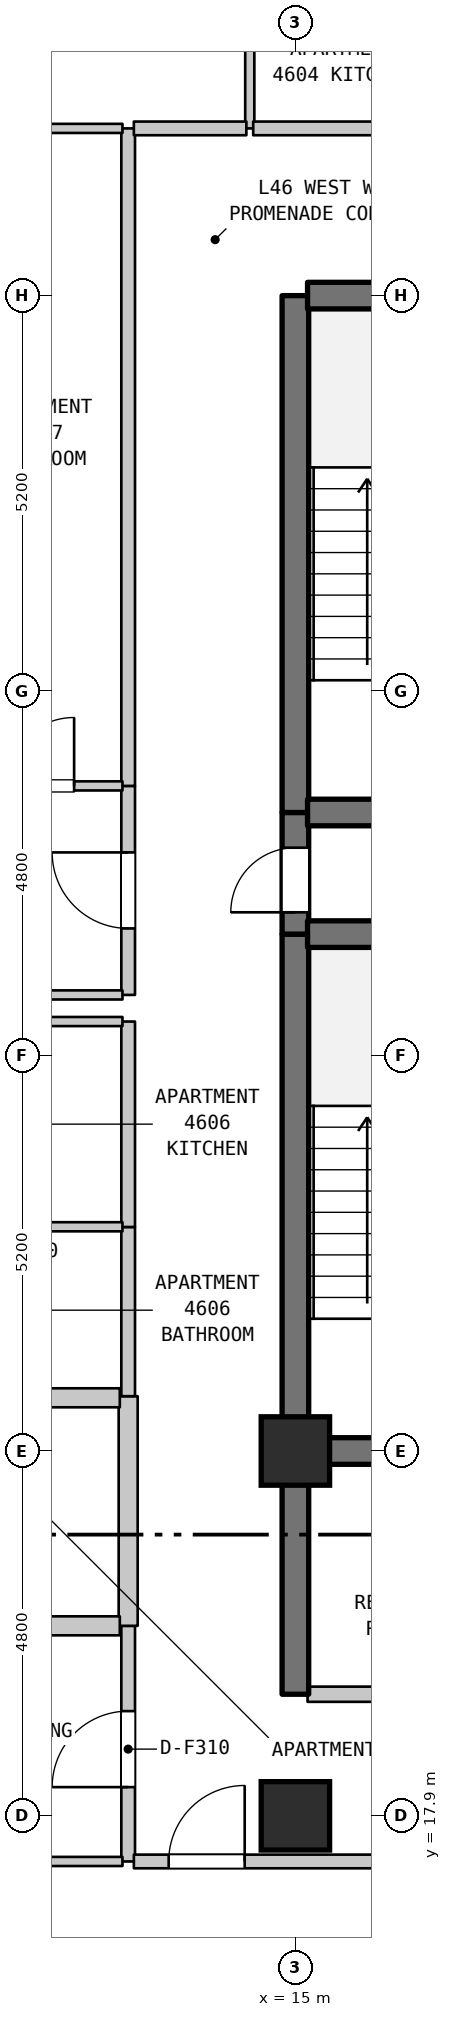
"""IFC4 building model, lengths in metres.
Left out: names, types, materials, properties, quantities, classifications, styles, units other than length and angle.
Written with IfcOpenShell. Run it as: python <this file> out.ifc"""

import sys

from ifc_helpers import new_model, si_unit, direction, frame, frame_2d, origin, origin_2d, place, context, subcontext, project, spatial, rectangle, extrude, element, fill, save


model = new_model("IFC4")
c1 = context("Model", 3, precision=1e-05, world=origin(), true_north=direction((0.0, 1.0)))
c2 = subcontext(c1, "Body", "Model", "MODEL_VIEW")
j1 = project(units=[si_unit("LENGTHUNIT", "METRE"), si_unit("PLANEANGLEUNIT", "RADIAN")], contexts=[c1])
p1 = place(None, origin())
s1 = spatial("IfcSite", under=j1, at=p1, CompositionType="ELEMENT")
p2 = place(p1, origin())
s2 = spatial("IfcBuilding", under=s1, at=p2, CompositionType="ELEMENT")
p3 = place(p2, frame((0.0, 0.0, 188.4)))
s3 = spatial("IfcBuildingStorey", under=s2, at=p3, CompositionType="ELEMENT", Elevation=188.4)
for number, where, z_axis, x_axis in (
    (1, (15.0, 17.9, 0.0), (0.0, 0.0, 1.0), (1.0, 0.0, 0.0)),
    (2, (15.0, 22.7, 0.0), (0.0, 0.0, 1.0), (1.0, 0.0, 0.0)),
):
    element("IfcColumn", number, at=place(p3, frame(where, z_axis=z_axis, x_axis=x_axis)), inside=s3, PredefinedType="COLUMN", context=c2, shape_type="SweptSolid", body=[
        extrude(rectangle(XDim=0.9, YDim=0.9, at=origin_2d()), origin(), (0.0, 0.0, 1.0), 3.7),
    ])
p4 = place(p3, frame((12.8, 17.3, 0.0), z_axis=(0.0, 0.0, 1.0), x_axis=(0.0, 1.0, 0.0)))
e3 = element("IfcWall", 3, at=p4, inside=s3, PredefinedType="STANDARD", context=c2, shape_type="SweptSolid", body=[
    extrude(rectangle(XDim=3.1, YDim=0.18, at=frame_2d((1.55, 0.0))), origin(), (0.0, 0.0, 1.0), 3.39),
])
p5 = place(p4, frame((0.978, 0.0, 0.0)))
e4 = element("IfcOpeningElement", 4, at=p5, cuts=e3, PredefinedType="OPENING", context=c2, shape_type="SweptSolid", body=[
    extrude(rectangle(XDim=1.0, YDim=2.15, at=frame_2d((0.5, 1.075))), frame((0.0, 0.1, 0.0), z_axis=(0.0, -1.0, 0.0), x_axis=(1.0, 0.0, 0.0)), (0.0, 0.0, 1.0), 0.2),
])
p6 = place(p3, frame((12.8, 20.4, 0.0), z_axis=(0.0, 0.0, 1.0), x_axis=(0.0, 1.0, 0.0)))
e5 = element("IfcWall", 5, at=p6, inside=s3, PredefinedType="STANDARD", context=c2, shape_type="SweptSolid", body=[
    extrude(rectangle(XDim=3.021, YDim=0.25, at=frame_2d((1.51, 0.0))), origin(), (0.0, 0.0, 1.0), 3.39),
])
p7 = place(p3, frame((12.8, 23.421, 0.0), z_axis=(0.0, 0.0, 1.0), x_axis=(0.0, 1.0, 0.0)))
e6 = element("IfcWall", 6, at=p7, inside=s3, PredefinedType="STANDARD", context=c2, shape_type="SweptSolid", body=[
    extrude(rectangle(XDim=2.226, YDim=0.18, at=frame_2d((1.113, 0.0))), origin(), (0.0, 0.0, 1.0), 3.39),
])
p8 = place(p3, frame((12.8, 25.647, 0.0), z_axis=(0.0, 0.0, 1.0), x_axis=(0.0, 1.0, 0.0)))
e7 = element("IfcWall", 7, at=p8, inside=s3, PredefinedType="STANDARD", context=c2, shape_type="SweptSolid", body=[
    extrude(rectangle(XDim=2.703, YDim=0.18, at=frame_2d((1.352, 0.0))), origin(), (0.0, 0.0, 1.0), 3.39),
])
p9 = place(p3, frame((12.8, 28.7, 0.0), z_axis=(0.0, 0.0, 1.0), x_axis=(0.0, 1.0, 0.0)))
e8 = element("IfcWall", 8, at=p9, inside=s3, PredefinedType="STANDARD", context=c2, shape_type="SweptSolid", body=[
    extrude(rectangle(XDim=2.75, YDim=0.18, at=frame_2d((1.375, 0.0))), origin(), (0.0, 0.0, 1.0), 3.39),
])
p10 = place(p9, frame((0.875, 0.0, 0.0)))
e9 = element("IfcOpeningElement", 9, at=p10, cuts=e8, PredefinedType="OPENING", context=c2, shape_type="SweptSolid", body=[
    extrude(rectangle(XDim=1.0, YDim=2.15, at=frame_2d((0.5, 1.075))), frame((0.0, 0.1, 0.0), z_axis=(0.0, -1.0, 0.0), x_axis=(1.0, 0.0, 0.0)), (0.0, 0.0, 1.0), 0.2),
])
p11 = place(p3, frame((12.8, 31.45, 0.0), z_axis=(0.0, 0.0, 1.0), x_axis=(0.0, 1.0, 0.0)))
e10 = element("IfcWall", 10, at=p11, inside=s3, PredefinedType="STANDARD", context=c2, shape_type="SweptSolid", body=[
    extrude(rectangle(XDim=8.65, YDim=0.18, at=frame_2d((4.325, 0.0))), origin(), (0.0, 0.0, 1.0), 3.39),
])
p12 = place(p3, frame((14.4, 40.1, 0.0), z_axis=(0.0, 0.0, 1.0), x_axis=(0.0, 1.0, 0.0)))
e11 = element("IfcWall", 11, at=p12, inside=s3, PredefinedType="PARTITIONING", context=c2, shape_type="SweptSolid", body=[
    extrude(rectangle(XDim=2.3, YDim=0.12, at=frame_2d((1.15, 0.0))), origin(), (0.0, 0.0, 1.0), 3.39),
])
p13 = place(p3, frame((15.0, 19.5, 0.0), z_axis=(0.0, 0.0, 1.0), x_axis=(0.0, 1.0, 0.0)))
e12 = element("IfcWall", 12, at=p13, inside=s3, PredefinedType="SHEAR", context=c2, shape_type="SweptSolid", body=[
    extrude(rectangle(XDim=3.2, YDim=0.35, at=frame_2d((1.6, 0.0))), origin(), (0.0, 0.0, 1.0), 3.39),
])
p14 = place(p3, frame((15.0, 22.7, 0.0), z_axis=(0.0, 0.0, 1.0), x_axis=(0.0, 1.0, 0.0)))
e13 = element("IfcWall", 13, at=p14, inside=s3, PredefinedType="SHEAR", context=c2, shape_type="SweptSolid", body=[
    extrude(rectangle(XDim=6.8, YDim=0.35, at=frame_2d((3.4, 0.0))), origin(), (0.0, 0.0, 1.0), 3.39),
])
p15 = place(p3, frame((15.0, 29.5, 0.0), z_axis=(0.0, 0.0, 1.0), x_axis=(0.0, 1.0, 0.0)))
e14 = element("IfcWall", 14, at=p15, inside=s3, PredefinedType="SHEAR", context=c2, shape_type="SweptSolid", body=[
    extrude(rectangle(XDim=1.6, YDim=0.35, at=frame_2d((0.8, 0.0))), origin(), (0.0, 0.0, 1.0), 3.39),
])
p16 = place(p15, frame((0.287, 0.0, 0.0)))
e15 = element("IfcOpeningElement", 15, at=p16, cuts=e14, PredefinedType="OPENING", context=c2, shape_type="SweptSolid", body=[
    extrude(rectangle(XDim=0.85, YDim=2.1, at=frame_2d((0.425, 1.05))), frame((0.0, 0.185, 0.0), z_axis=(0.0, -1.0, 0.0), x_axis=(1.0, 0.0, 0.0)), (0.0, 0.0, 1.0), 0.37),
])
p17 = place(p3, frame((15.0, 31.1, 0.0), z_axis=(0.0, 0.0, 1.0), x_axis=(0.0, 1.0, 0.0)))
e16 = element("IfcWall", 16, at=p17, inside=s3, PredefinedType="SHEAR", context=c2, shape_type="SweptSolid", body=[
    extrude(rectangle(XDim=6.8, YDim=0.35, at=frame_2d((3.4, 0.0))), origin(), (0.0, 0.0, 1.0), 3.39),
])
p18 = place(p3, frame((9.085, 17.3, 0.0), z_axis=(0.0, 0.0, 1.0), x_axis=(1.0, 0.0, 0.0)))
e17 = element("IfcWall", 17, at=p18, inside=s3, PredefinedType="PARTITIONING", context=c2, shape_type="SweptSolid", body=[
    extrude(rectangle(XDim=3.64, YDim=0.12, at=frame_2d((1.82, 0.0))), origin(), (0.0, 0.0, 1.0), 3.39),
])
p19 = place(p3, frame((12.875, 17.3, 0.0), z_axis=(0.0, 0.0, 1.0), x_axis=(1.0, 0.0, 0.0)))
e18 = element("IfcWall", 18, at=p19, inside=s3, PredefinedType="STANDARD", context=c2, shape_type="SweptSolid", body=[
    extrude(rectangle(XDim=3.78, YDim=0.18, at=frame_2d((1.89, 0.0))), origin(), (0.0, 0.0, 1.0), 3.39),
])
p20 = place(p19, frame((0.458, 0.0, 0.0)))
e19 = element("IfcOpeningElement", 19, at=p20, cuts=e18, PredefinedType="OPENING", context=c2, shape_type="SweptSolid", body=[
    extrude(rectangle(XDim=1.0, YDim=2.15, at=frame_2d((0.5, 1.075))), frame((0.0, 0.1, 0.0), z_axis=(0.0, -1.0, 0.0), x_axis=(1.0, 0.0, 0.0)), (0.0, 0.0, 1.0), 0.2),
])
p21 = place(p3, frame((15.16, 19.5, 0.0), z_axis=(0.0, 0.0, 1.0), x_axis=(1.0, 0.0, 0.0)))
e20 = element("IfcWall", 20, at=p21, inside=s3, PredefinedType="STANDARD", context=c2, shape_type="SweptSolid", body=[
    extrude(rectangle(XDim=3.68, YDim=0.2, at=frame_2d((1.84, 0.0))), origin(), (0.0, 0.0, 1.0), 3.39),
])
p22 = place(p21, frame((1.39, 0.0, 0.0)))
e21 = element("IfcOpeningElement", 21, at=p22, cuts=e20, PredefinedType="OPENING", context=c2, shape_type="SweptSolid", body=[
    extrude(rectangle(XDim=0.9, YDim=2.15, at=frame_2d((0.45, 1.075))), frame((0.0, 0.11, 0.0), z_axis=(0.0, -1.0, 0.0), x_axis=(1.0, 0.0, 0.0)), (0.0, 0.0, 1.0), 0.22),
])
p23 = place(p3, frame((10.66, 20.4, 0.0), z_axis=(0.0, 0.0, 1.0), x_axis=(1.0, 0.0, 0.0)))
e22 = element("IfcWall", 22, at=p23, inside=s3, PredefinedType="STANDARD", context=c2, shape_type="SweptSolid", body=[
    extrude(rectangle(XDim=2.03, YDim=0.25, at=frame_2d((1.015, 0.0))), origin(), (0.0, 0.0, 1.0), 3.39),
])
p24 = place(p3, frame((15.16, 22.7, 0.0), z_axis=(0.0, 0.0, 1.0), x_axis=(1.0, 0.0, 0.0)))
e23 = element("IfcWall", 23, at=p24, inside=s3, PredefinedType="SHEAR", context=c2, shape_type="SweptSolid", body=[
    extrude(rectangle(XDim=3.68, YDim=0.35, at=frame_2d((1.84, 0.0))), origin(), (0.0, 0.0, 1.0), 3.39),
])
p25 = place(p3, frame((10.66, 23.4, 0.0), z_axis=(0.0, 0.0, 1.0), x_axis=(1.0, 0.0, 0.0)))
e24 = element("IfcWall", 24, at=p25, inside=s3, PredefinedType="STANDARD", context=c2, shape_type="SweptSolid", body=[
    extrude(rectangle(XDim=2.03, YDim=0.25, at=frame_2d((1.015, 0.0))), origin(), (0.0, 0.0, 1.0), 3.39),
])
for number, where, z_axis, x_axis in (
    (25, (10.595, 25.65, 0.0), (0.0, 0.0, 1.0), (1.0, 0.0, 0.0)),
    (26, (10.595, 28.35, 0.0), (0.0, 0.0, 1.0), (1.0, 0.0, 0.0)),
):
    element("IfcWall", number, at=place(p3, frame(where, z_axis=z_axis, x_axis=x_axis)), inside=s3, PredefinedType="PARTITIONING", context=c2, shape_type="SweptSolid", body=[
        extrude(rectangle(XDim=2.13, YDim=0.12, at=frame_2d((1.065, 0.0))), origin(), (0.0, 0.0, 1.0), 3.39),
    ])
p26 = place(p3, frame((9.03, 28.7, 0.0), z_axis=(0.0, 0.0, 1.0), x_axis=(1.0, 0.0, 0.0)))
e27 = element("IfcWall", 27, at=p26, inside=s3, PredefinedType="PARTITIONING", context=c2, shape_type="SweptSolid", body=[
    extrude(rectangle(XDim=3.695, YDim=0.12, at=frame_2d((1.848, 0.0))), origin(), (0.0, 0.0, 1.0), 3.39),
])
for number, where, z_axis, x_axis in (
    (28, (15.16, 29.5, 0.0), (0.0, 0.0, 1.0), (1.0, 0.0, 0.0)),
    (29, (15.16, 31.1, 0.0), (0.0, 0.0, 1.0), (1.0, 0.0, 0.0)),
):
    element("IfcWall", number, at=place(p3, frame(where, z_axis=z_axis, x_axis=x_axis)), inside=s3, PredefinedType="SHEAR", context=c2, shape_type="SweptSolid", body=[
        extrude(rectangle(XDim=3.68, YDim=0.35, at=frame_2d((1.84, 0.0))), origin(), (0.0, 0.0, 1.0), 3.39),
    ])
p27 = place(p3, frame((10.523, 31.45, 0.0), z_axis=(0.0, 0.0, 1.0), x_axis=(1.0, 0.0, 0.0)))
e30 = element("IfcWall", 30, at=p27, inside=s3, PredefinedType="PARTITIONING", context=c2, shape_type="SweptSolid", body=[
    extrude(rectangle(XDim=2.202, YDim=0.12, at=frame_2d((1.101, 0.0))), origin(), (0.0, 0.0, 1.0), 3.39),
])
p28 = place(p27, frame((0.666, 0.0, 0.0)))
e31 = element("IfcOpeningElement", 31, at=p28, cuts=e30, PredefinedType="OPENING", context=c2, shape_type="SweptSolid", body=[
    extrude(rectangle(XDim=0.9, YDim=2.1, at=frame_2d((0.45, 1.05))), frame((0.0, 0.07, 0.0), z_axis=(0.0, -1.0, 0.0), x_axis=(1.0, 0.0, 0.0)), (0.0, 0.0, 1.0), 0.14),
])
p29 = place(p3, frame((15.16, 37.9, 0.0), z_axis=(0.0, 0.0, 1.0), x_axis=(1.0, 0.0, 0.0)))
e32 = element("IfcWall", 32, at=p29, inside=s3, PredefinedType="SHEAR", context=c2, shape_type="SweptSolid", body=[
    extrude(rectangle(XDim=3.68, YDim=0.35, at=frame_2d((1.84, 0.0))), origin(), (0.0, 0.0, 1.0), 3.39),
])
p30 = place(p3, frame((10.523, 40.1, 0.0), z_axis=(0.0, 0.0, 1.0), x_axis=(1.0, 0.0, 0.0)))
e33 = element("IfcWall", 33, at=p30, inside=s3, PredefinedType="PARTITIONING", context=c2, shape_type="SweptSolid", body=[
    extrude(rectangle(XDim=2.202, YDim=0.12, at=frame_2d((1.101, 0.0))), origin(), (0.0, 0.0, 1.0), 3.39),
])
p31 = place(p3, frame((12.875, 40.1, 0.0), z_axis=(0.0, 0.0, 1.0), x_axis=(1.0, 0.0, 0.0)))
e34 = element("IfcWall", 34, at=p31, inside=s3, PredefinedType="STANDARD", context=c2, shape_type="SweptSolid", body=[
    extrude(rectangle(XDim=1.48, YDim=0.18, at=frame_2d((0.74, 0.0))), origin(), (0.0, 0.0, 1.0), 3.39),
])
p32 = place(p3, frame((14.445, 40.1, 0.0), z_axis=(0.0, 0.0, 1.0), x_axis=(1.0, 0.0, 0.0)))
e35 = element("IfcWall", 35, at=p32, inside=s3, PredefinedType="STANDARD", context=c2, shape_type="SweptSolid", body=[
    extrude(rectangle(XDim=3.102, YDim=0.18, at=frame_2d((1.551, 0.0))), origin(), (0.0, 0.0, 1.0), 3.39),
])
p33 = place(p5, origin())
e36 = element("IfcDoor", 36, at=p33, inside=s3, OperationType="SINGLE_SWING_LEFT", PredefinedType="DOOR", context=c2, shape_type="SweptSolid", body=[
    extrude(rectangle(XDim=1.0, YDim=2.15, at=frame_2d((0.5, 1.075))), frame((0.0, 0.025, 0.0), z_axis=(0.0, -1.0, 0.0), x_axis=(1.0, 0.0, 0.0)), (0.0, 0.0, 1.0), 0.05),
])
fill(e4, e36)
p34 = place(p10, origin())
e37 = element("IfcDoor", 37, at=p34, inside=s3, OperationType="SINGLE_SWING_RIGHT", PredefinedType="DOOR", context=c2, shape_type="SweptSolid", body=[
    extrude(rectangle(XDim=1.0, YDim=2.15, at=frame_2d((0.5, 1.075))), frame((0.0, 0.025, 0.0), z_axis=(0.0, -1.0, 0.0), x_axis=(1.0, 0.0, 0.0)), (0.0, 0.0, 1.0), 0.05),
])
fill(e9, e37)
p35 = place(p16, origin())
e38 = element("IfcDoor", 38, at=p35, inside=s3, OperationType="SINGLE_SWING_LEFT", PredefinedType="DOOR", context=c2, shape_type="SweptSolid", body=[
    extrude(rectangle(XDim=0.85, YDim=2.1, at=frame_2d((0.425, 1.05))), frame((0.0, 0.025, 0.0), z_axis=(0.0, -1.0, 0.0), x_axis=(1.0, 0.0, 0.0)), (0.0, 0.0, 1.0), 0.05),
])
fill(e15, e38)
p36 = place(p20, origin())
e39 = element("IfcDoor", 39, at=p36, inside=s3, OperationType="SINGLE_SWING_RIGHT", PredefinedType="DOOR", context=c2, shape_type="SweptSolid", body=[
    extrude(rectangle(XDim=1.0, YDim=2.15, at=frame_2d((0.5, 1.075))), frame((0.0, 0.025, 0.0), z_axis=(0.0, -1.0, 0.0), x_axis=(1.0, 0.0, 0.0)), (0.0, 0.0, 1.0), 0.05),
])
fill(e19, e39)
p37 = place(p28, origin())
e40 = element("IfcDoor", 40, at=p37, inside=s3, OperationType="SINGLE_SWING_RIGHT", PredefinedType="DOOR", context=c2, shape_type="SweptSolid", body=[
    extrude(rectangle(XDim=0.9, YDim=2.1, at=frame_2d((0.45, 1.05))), frame((0.0, 0.025, 0.0), z_axis=(0.0, -1.0, 0.0), x_axis=(1.0, 0.0, 0.0)), (0.0, 0.0, 1.0), 0.05),
])
fill(e31, e40)
save(model, sys.argv[1])
